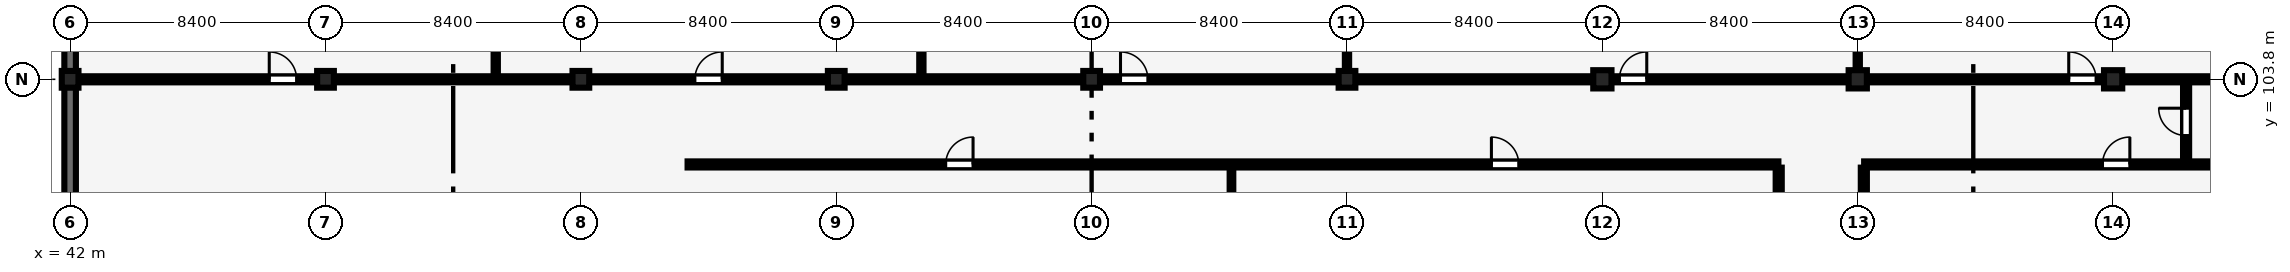
"""IFC4 building model, lengths in metres.
Left out: names, types, materials, properties, quantities, classifications, styles, units other than length and angle.
Written with IfcOpenShell. Run it as: python <this file> out.ifc"""

import sys

from ifc_helpers import new_model, si_unit, direction, frame, frame_2d, origin, origin_2d, place, context, subcontext, project, spatial, rectangle, extrude, element, fill, save


model = new_model("IFC4")
c1 = context("Model", 3, precision=1e-05, world=origin(), true_north=direction((0.0, 1.0)))
c2 = subcontext(c1, "Body", "Model", "MODEL_VIEW")
j1 = project(units=[si_unit("LENGTHUNIT", "METRE"), si_unit("PLANEANGLEUNIT", "RADIAN")], contexts=[c1])
p1 = place(None, origin())
s1 = spatial("IfcSite", under=j1, at=p1, CompositionType="ELEMENT")
p2 = place(p1, origin())
s2 = spatial("IfcBuilding", under=s1, at=p2, CompositionType="ELEMENT")
p3 = place(p2, frame((0.0, 0.0, 9.0)))
s3 = spatial("IfcBuildingStorey", under=s2, at=p3, CompositionType="ELEMENT", Elevation=9.0)
for number, where, z_axis, x_axis in (
    (1, (42.0, 103.8, 0.0), (0.0, 0.0, 1.0), (1.0, 0.0, 0.0)),
    (2, (50.4, 103.8, 0.0), (0.0, 0.0, 1.0), (1.0, 0.0, 0.0)),
    (3, (58.8, 103.8, 0.0), (0.0, 0.0, 1.0), (1.0, 0.0, 0.0)),
    (4, (67.2, 103.8, 0.0), (0.0, 0.0, 1.0), (1.0, 0.0, 0.0)),
    (5, (75.6, 103.8, 0.0), (0.0, 0.0, 1.0), (1.0, 0.0, 0.0)),
    (6, (84.0, 103.8, 0.0), (0.0, 0.0, 1.0), (1.0, 0.0, 0.0)),
):
    element("IfcColumn", number, at=place(p3, frame(where, z_axis=z_axis, x_axis=x_axis)), inside=s3, PredefinedType="COLUMN", context=c2, shape_type="SweptSolid", body=[
        extrude(rectangle(XDim=0.55, YDim=0.55, at=origin_2d()), origin(), (0.0, 0.0, 1.0), 4.2),
    ])
for number, where, z_axis, x_axis in (
    (7, (92.4, 103.8, 0.0), (0.0, 0.0, 1.0), (1.0, 0.0, 0.0)),
    (8, (100.8, 103.8, 0.0), (0.0, 0.0, 1.0), (1.0, 0.0, 0.0)),
    (9, (109.2, 103.8, 0.0), (0.0, 0.0, 1.0), (1.0, 0.0, 0.0)),
):
    element("IfcColumn", number, at=place(p3, frame(where, z_axis=z_axis, x_axis=x_axis)), inside=s3, PredefinedType="COLUMN", context=c2, shape_type="SweptSolid", body=[
        extrude(rectangle(XDim=0.6, YDim=0.6, at=origin_2d()), origin(), (0.0, 0.0, 1.0), 4.2),
    ])
p4 = place(p3, frame((42.0, 95.05, 0.0), z_axis=(0.0, 0.0, 1.0), x_axis=(0.0, 1.0, 0.0)))
e10 = element("IfcWall", 10, at=p4, inside=s3, PredefinedType="SHEAR", context=c2, shape_type="SweptSolid", body=[
    extrude(rectangle(XDim=8.5, YDim=0.38, at=frame_2d((4.25, 0.0))), origin(), (0.0, 0.0, 1.0), 3.36),
])
p5 = place(p3, frame((42.0, 104.05, 0.0), z_axis=(0.0, 0.0, 1.0), x_axis=(0.0, 1.0, 0.0)))
e11 = element("IfcWall", 11, at=p5, inside=s3, PredefinedType="SHEAR", context=c2, shape_type="SweptSolid", body=[
    extrude(rectangle(XDim=8.5, YDim=0.38, at=frame_2d((4.25, 0.0))), origin(), (0.0, 0.0, 1.0), 3.31),
])
p6 = place(p3, frame((111.6, 101.01, 0.0), z_axis=(0.0, 0.0, 1.0), x_axis=(0.0, 1.0, 0.0)))
e12 = element("IfcWall", 12, at=p6, inside=s3, PredefinedType="PARTITIONING", context=c2, shape_type="SweptSolid", body=[
    extrude(rectangle(XDim=2.78, YDim=0.2, at=frame_2d((1.39, 0.0))), origin(), (0.0, 0.0, 1.0), 3.9),
])
p7 = place(p6, frame((0.94, 0.0, 0.0)))
e13 = element("IfcOpeningElement", 13, at=p7, cuts=e12, PredefinedType="OPENING", context=c2, shape_type="SweptSolid", body=[
    extrude(rectangle(XDim=0.9, YDim=2.1, at=frame_2d((0.45, 1.05))), frame((0.0, 0.11, 0.0), z_axis=(0.0, -1.0, 0.0), x_axis=(1.0, 0.0, 0.0)), (0.0, 0.0, 1.0), 0.22),
])
for number, where, z_axis, x_axis in (
    (14, (56.0, 103.905, 0.0), (0.0, 0.0, 1.0), (0.0, 1.0, 0.0)),
    (15, (70.0, 103.905, 0.0), (0.0, 0.0, 1.0), (0.0, 1.0, 0.0)),
):
    element("IfcWall", number, at=place(p3, frame(where, z_axis=z_axis, x_axis=x_axis)), inside=s3, PredefinedType="PARTITIONING", context=c2, shape_type="SweptSolid", body=[
        extrude(rectangle(XDim=8.79, YDim=0.14, at=frame_2d((4.395, 0.0))), origin(), (0.0, 0.0, 1.0), 3.9),
    ])
p8 = place(p3, frame((84.0, 103.905, 0.0), z_axis=(0.0, 0.0, 1.0), x_axis=(0.0, 1.0, 0.0)))
e16 = element("IfcWall", 16, at=p8, inside=s3, PredefinedType="PARTITIONING", context=c2, shape_type="SweptSolid", body=[
    extrude(rectangle(XDim=8.73, YDim=0.14, at=frame_2d((4.365, 0.0))), origin(), (0.0, 0.0, 1.0), 3.11),
])
p9 = place(p3, frame((100.8, 103.905, 0.0), z_axis=(0.0, 0.0, 1.0), x_axis=(0.0, 1.0, 0.0)))
e17 = element("IfcWall", 17, at=p9, inside=s3, PredefinedType="PARTITIONING", context=c2, shape_type="SweptSolid", body=[
    extrude(rectangle(XDim=8.73, YDim=0.14, at=frame_2d((4.365, 0.0))), origin(), (0.0, 0.0, 1.0), 2.96),
])
p10 = place(p3, frame((42.195, 103.8, 0.0), z_axis=(0.0, 0.0, 1.0), x_axis=(1.0, 0.0, 0.0)))
e18 = element("IfcWall", 18, at=p10, inside=s3, PredefinedType="PARTITIONING", context=c2, shape_type="SweptSolid", body=[
    extrude(rectangle(XDim=7.92, YDim=0.2, at=frame_2d((3.96, 0.0))), origin(), (0.0, 0.0, 1.0), 3.21),
])
p11 = place(p10, frame((6.355, 0.0, 0.0)))
e19 = element("IfcOpeningElement", 19, at=p11, cuts=e18, PredefinedType="OPENING", context=c2, shape_type="SweptSolid", body=[
    extrude(rectangle(XDim=0.9, YDim=2.1, at=frame_2d((0.45, 1.05))), frame((0.0, 0.11, 0.0), z_axis=(0.0, -1.0, 0.0), x_axis=(1.0, 0.0, 0.0)), (0.0, 0.0, 1.0), 0.22),
])
p12 = place(p3, frame((50.685, 103.8, 0.0), z_axis=(0.0, 0.0, 1.0), x_axis=(1.0, 0.0, 0.0)))
e20 = element("IfcWall", 20, at=p12, inside=s3, PredefinedType="PARTITIONING", context=c2, shape_type="SweptSolid", body=[
    extrude(rectangle(XDim=7.83, YDim=0.2, at=frame_2d((3.915, 0.0))), origin(), (0.0, 0.0, 1.0), 3.16),
])
p13 = place(p3, frame((59.085, 103.8, 0.0), z_axis=(0.0, 0.0, 1.0), x_axis=(1.0, 0.0, 0.0)))
e21 = element("IfcWall", 21, at=p13, inside=s3, PredefinedType="PARTITIONING", context=c2, shape_type="SweptSolid", body=[
    extrude(rectangle(XDim=7.83, YDim=0.2, at=frame_2d((3.915, 0.0))), origin(), (0.0, 0.0, 1.0), 3.11),
])
p14 = place(p13, frame((3.465, 0.0, 0.0)))
e22 = element("IfcOpeningElement", 22, at=p14, cuts=e21, PredefinedType="OPENING", context=c2, shape_type="SweptSolid", body=[
    extrude(rectangle(XDim=0.9, YDim=2.1, at=frame_2d((0.45, 1.05))), frame((0.0, 0.11, 0.0), z_axis=(0.0, -1.0, 0.0), x_axis=(1.0, 0.0, 0.0)), (0.0, 0.0, 1.0), 0.22),
])
p15 = place(p3, frame((67.485, 103.8, 0.0), z_axis=(0.0, 0.0, 1.0), x_axis=(1.0, 0.0, 0.0)))
e23 = element("IfcWall", 23, at=p15, inside=s3, PredefinedType="PARTITIONING", context=c2, shape_type="SweptSolid", body=[
    extrude(rectangle(XDim=7.83, YDim=0.2, at=frame_2d((3.915, 0.0))), origin(), (0.0, 0.0, 1.0), 3.11),
])
p16 = place(p3, frame((75.885, 103.8, 0.0), z_axis=(0.0, 0.0, 1.0), x_axis=(1.0, 0.0, 0.0)))
e24 = element("IfcWall", 24, at=p16, inside=s3, PredefinedType="PARTITIONING", context=c2, shape_type="SweptSolid", body=[
    extrude(rectangle(XDim=7.83, YDim=0.2, at=frame_2d((3.915, 0.0))), origin(), (0.0, 0.0, 1.0), 3.06),
])
p17 = place(p16, frame((0.665, 0.0, 0.0)))
e25 = element("IfcOpeningElement", 25, at=p17, cuts=e24, PredefinedType="OPENING", context=c2, shape_type="SweptSolid", body=[
    extrude(rectangle(XDim=0.9, YDim=2.1, at=frame_2d((0.45, 1.05))), frame((0.0, 0.11, 0.0), z_axis=(0.0, -1.0, 0.0), x_axis=(1.0, 0.0, 0.0)), (0.0, 0.0, 1.0), 0.22),
])
p18 = place(p3, frame((84.285, 103.8, 0.0), z_axis=(0.0, 0.0, 1.0), x_axis=(1.0, 0.0, 0.0)))
e26 = element("IfcWall", 26, at=p18, inside=s3, PredefinedType="PARTITIONING", context=c2, shape_type="SweptSolid", body=[
    extrude(rectangle(XDim=7.805, YDim=0.2, at=frame_2d((3.903, 0.0))), origin(), (0.0, 0.0, 1.0), 3.01),
])
p19 = place(p3, frame((92.71, 103.8, 0.0), z_axis=(0.0, 0.0, 1.0), x_axis=(1.0, 0.0, 0.0)))
e27 = element("IfcWall", 27, at=p19, inside=s3, PredefinedType="PARTITIONING", context=c2, shape_type="SweptSolid", body=[
    extrude(rectangle(XDim=7.78, YDim=0.2, at=frame_2d((3.89, 0.0))), origin(), (0.0, 0.0, 1.0), 3.01),
])
p20 = place(p19, frame((0.25, 0.0, 0.0)))
e28 = element("IfcOpeningElement", 28, at=p20, cuts=e27, PredefinedType="OPENING", context=c2, shape_type="SweptSolid", body=[
    extrude(rectangle(XDim=0.9, YDim=2.1, at=frame_2d((0.45, 1.05))), frame((0.0, 0.11, 0.0), z_axis=(0.0, -1.0, 0.0), x_axis=(1.0, 0.0, 0.0)), (0.0, 0.0, 1.0), 0.22),
])
p21 = place(p3, frame((101.11, 103.8, 0.0), z_axis=(0.0, 0.0, 1.0), x_axis=(1.0, 0.0, 0.0)))
e29 = element("IfcWall", 29, at=p21, inside=s3, PredefinedType="PARTITIONING", context=c2, shape_type="SweptSolid", body=[
    extrude(rectangle(XDim=7.78, YDim=0.2, at=frame_2d((3.89, 0.0))), origin(), (0.0, 0.0, 1.0), 2.96),
])
p22 = place(p21, frame((6.63, 0.0, 0.0)))
e30 = element("IfcOpeningElement", 30, at=p22, cuts=e29, PredefinedType="OPENING", context=c2, shape_type="SweptSolid", body=[
    extrude(rectangle(XDim=0.9, YDim=2.1, at=frame_2d((0.45, 1.05))), frame((0.0, 0.11, 0.0), z_axis=(0.0, -1.0, 0.0), x_axis=(1.0, 0.0, 0.0)), (0.0, 0.0, 1.0), 0.22),
])
p23 = place(p3, frame((109.51, 103.8, 0.0), z_axis=(0.0, 0.0, 1.0), x_axis=(1.0, 0.0, 0.0)))
e31 = element("IfcWall", 31, at=p23, inside=s3, PredefinedType="PARTITIONING", context=c2, shape_type="SweptSolid", body=[
    extrude(rectangle(XDim=7.895, YDim=0.2, at=frame_2d((3.948, 0.0))), origin(), (0.0, 0.0, 1.0), 2.91),
])
p24 = place(p3, frame((80.2, 94.905, 0.0), z_axis=(0.0, 0.0, 1.0), x_axis=(0.0, 1.0, 0.0)))
e32 = element("IfcWall", 32, at=p24, inside=s3, PredefinedType="PARTITIONING", context=c2, shape_type="SweptSolid", body=[
    extrude(rectangle(XDim=5.99, YDim=0.12, at=frame_2d((2.995, 0.0))), origin(), (0.0, 0.0, 1.0), 3.9),
])
p25 = place(p3, frame((62.31, 101.0, 0.0), z_axis=(0.0, 0.0, 1.0), x_axis=(1.0, 0.0, 0.0)))
e33 = element("IfcWall", 33, at=p25, inside=s3, PredefinedType="PARTITIONING", context=c2, shape_type="SweptSolid", body=[
    extrude(rectangle(XDim=35.88, YDim=0.2, at=frame_2d((17.94, 0.0))), origin(), (0.0, 0.0, 1.0), 3.48),
])
p26 = place(p25, frame((8.49, 0.0, 0.0)))
e34 = element("IfcOpeningElement", 34, at=p26, cuts=e33, PredefinedType="OPENING", context=c2, shape_type="SweptSolid", body=[
    extrude(rectangle(XDim=0.9, YDim=2.1, at=frame_2d((0.45, 1.05))), frame((0.0, 0.11, 0.0), z_axis=(0.0, -1.0, 0.0), x_axis=(1.0, 0.0, 0.0)), (0.0, 0.0, 1.0), 0.22),
])
p27 = place(p25, frame((26.44, 0.0, 0.0)))
e35 = element("IfcOpeningElement", 35, at=p27, cuts=e33, PredefinedType="OPENING", context=c2, shape_type="SweptSolid", body=[
    extrude(rectangle(XDim=0.9, YDim=2.1, at=frame_2d((0.45, 1.05))), frame((0.0, 0.11, 0.0), z_axis=(0.0, -1.0, 0.0), x_axis=(1.0, 0.0, 0.0)), (0.0, 0.0, 1.0), 0.22),
])
p28 = place(p3, frame((98.2, 94.81, 0.0), z_axis=(0.0, 0.0, 1.0), x_axis=(0.0, 1.0, 0.0)))
e36 = element("IfcWall", 36, at=p28, inside=s3, PredefinedType="PARTITIONING", context=c2, shape_type="SweptSolid", body=[
    extrude(rectangle(XDim=6.085, YDim=0.2, at=frame_2d((3.042, 0.0))), origin(), (0.0, 0.0, 1.0), 3.9),
])
p29 = place(p3, frame((101.01, 101.0, 0.0), z_axis=(0.0, 0.0, 1.0), x_axis=(1.0, 0.0, 0.0)))
e37 = element("IfcWall", 37, at=p29, inside=s3, PredefinedType="PARTITIONING", context=c2, shape_type="SweptSolid", body=[
    extrude(rectangle(XDim=16.395, YDim=0.2, at=frame_2d((8.198, 0.0))), origin(), (0.0, 0.0, 1.0), 3.48),
])
p30 = place(p29, frame((7.84, 0.0, 0.0)))
e38 = element("IfcOpeningElement", 38, at=p30, cuts=e37, PredefinedType="OPENING", context=c2, shape_type="SweptSolid", body=[
    extrude(rectangle(XDim=0.9, YDim=2.1, at=frame_2d((0.45, 1.05))), frame((0.0, 0.11, 0.0), z_axis=(0.0, -1.0, 0.0), x_axis=(1.0, 0.0, 0.0)), (0.0, 0.0, 1.0), 0.22),
])
p31 = place(p3, frame((101.0, 95.11, 0.0), z_axis=(0.0, 0.0, 1.0), x_axis=(0.0, 1.0, 0.0)))
e39 = element("IfcWall", 39, at=p31, inside=s3, PredefinedType="PARTITIONING", context=c2, shape_type="SweptSolid", body=[
    extrude(rectangle(XDim=5.785, YDim=0.2, at=frame_2d((2.893, 0.0))), origin(), (0.0, 0.0, 1.0), 3.01),
])
p32 = place(p7, origin())
e40 = element("IfcDoor", 40, at=p32, inside=s3, OperationType="SINGLE_SWING_RIGHT", PredefinedType="DOOR", context=c2, shape_type="SweptSolid", body=[
    extrude(rectangle(XDim=0.9, YDim=2.1, at=frame_2d((0.45, 1.05))), frame((0.0, 0.025, 0.0), z_axis=(0.0, -1.0, 0.0), x_axis=(1.0, 0.0, 0.0)), (0.0, 0.0, 1.0), 0.05),
])
fill(e13, e40)
p33 = place(p11, origin())
e41 = element("IfcDoor", 41, at=p33, inside=s3, OperationType="SINGLE_SWING_LEFT", PredefinedType="DOOR", context=c2, shape_type="SweptSolid", body=[
    extrude(rectangle(XDim=0.9, YDim=2.1, at=frame_2d((0.45, 1.05))), frame((0.0, 0.025, 0.0), z_axis=(0.0, -1.0, 0.0), x_axis=(1.0, 0.0, 0.0)), (0.0, 0.0, 1.0), 0.05),
])
fill(e19, e41)
p34 = place(p14, origin())
e42 = element("IfcDoor", 42, at=p34, inside=s3, OperationType="SINGLE_SWING_RIGHT", PredefinedType="DOOR", context=c2, shape_type="SweptSolid", body=[
    extrude(rectangle(XDim=0.9, YDim=2.1, at=frame_2d((0.45, 1.05))), frame((0.0, 0.025, 0.0), z_axis=(0.0, -1.0, 0.0), x_axis=(1.0, 0.0, 0.0)), (0.0, 0.0, 1.0), 0.05),
])
fill(e22, e42)
p35 = place(p17, origin())
e43 = element("IfcDoor", 43, at=p35, inside=s3, OperationType="SINGLE_SWING_LEFT", PredefinedType="DOOR", context=c2, shape_type="SweptSolid", body=[
    extrude(rectangle(XDim=0.9, YDim=2.1, at=frame_2d((0.45, 1.05))), frame((0.0, 0.025, 0.0), z_axis=(0.0, -1.0, 0.0), x_axis=(1.0, 0.0, 0.0)), (0.0, 0.0, 1.0), 0.05),
])
fill(e25, e43)
p36 = place(p20, origin())
e44 = element("IfcDoor", 44, at=p36, inside=s3, OperationType="SINGLE_SWING_RIGHT", PredefinedType="DOOR", context=c2, shape_type="SweptSolid", body=[
    extrude(rectangle(XDim=0.9, YDim=2.1, at=frame_2d((0.45, 1.05))), frame((0.0, 0.025, 0.0), z_axis=(0.0, -1.0, 0.0), x_axis=(1.0, 0.0, 0.0)), (0.0, 0.0, 1.0), 0.05),
])
fill(e28, e44)
p37 = place(p22, origin())
e45 = element("IfcDoor", 45, at=p37, inside=s3, OperationType="SINGLE_SWING_LEFT", PredefinedType="DOOR", context=c2, shape_type="SweptSolid", body=[
    extrude(rectangle(XDim=0.9, YDim=2.1, at=frame_2d((0.45, 1.05))), frame((0.0, 0.025, 0.0), z_axis=(0.0, -1.0, 0.0), x_axis=(1.0, 0.0, 0.0)), (0.0, 0.0, 1.0), 0.05),
])
fill(e30, e45)
p38 = place(p26, origin())
e46 = element("IfcDoor", 46, at=p38, inside=s3, OperationType="SINGLE_SWING_RIGHT", PredefinedType="DOOR", context=c2, shape_type="SweptSolid", body=[
    extrude(rectangle(XDim=0.9, YDim=2.1, at=frame_2d((0.45, 1.05))), frame((0.0, 0.025, 0.0), z_axis=(0.0, -1.0, 0.0), x_axis=(1.0, 0.0, 0.0)), (0.0, 0.0, 1.0), 0.05),
])
fill(e34, e46)
p39 = place(p27, origin())
e47 = element("IfcDoor", 47, at=p39, inside=s3, OperationType="SINGLE_SWING_LEFT", PredefinedType="DOOR", context=c2, shape_type="SweptSolid", body=[
    extrude(rectangle(XDim=0.9, YDim=2.1, at=frame_2d((0.45, 1.05))), frame((0.0, 0.025, 0.0), z_axis=(0.0, -1.0, 0.0), x_axis=(1.0, 0.0, 0.0)), (0.0, 0.0, 1.0), 0.05),
])
fill(e35, e47)
p40 = place(p30, origin())
e48 = element("IfcDoor", 48, at=p40, inside=s3, OperationType="SINGLE_SWING_RIGHT", PredefinedType="DOOR", context=c2, shape_type="SweptSolid", body=[
    extrude(rectangle(XDim=0.9, YDim=2.1, at=frame_2d((0.45, 1.05))), frame((0.0, 0.025, 0.0), z_axis=(0.0, -1.0, 0.0), x_axis=(1.0, 0.0, 0.0)), (0.0, 0.0, 1.0), 0.05),
])
fill(e38, e48)
save(model, sys.argv[1])
